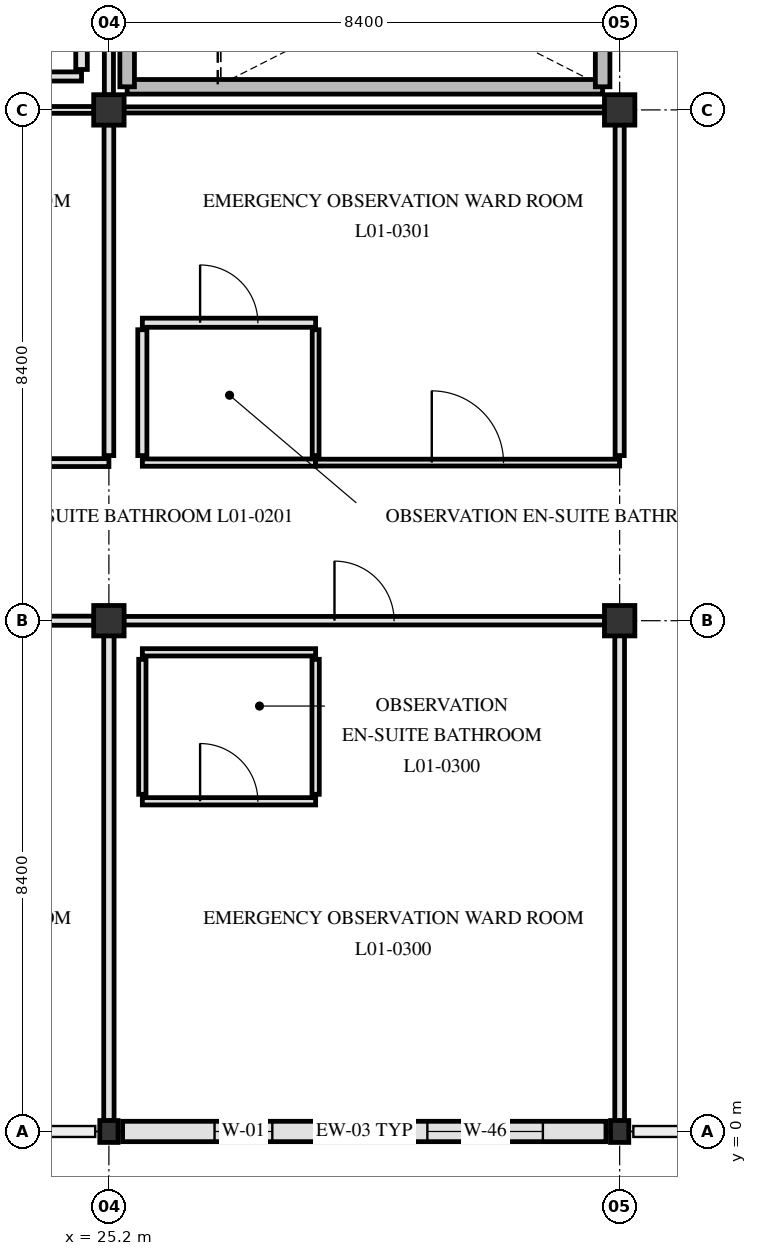
"""IFC4 building model, lengths in metres.
Left out: names, types, materials, properties, quantities, classifications, styles, units other than length and angle.
Written with IfcOpenShell. Run it as: python <this file> out.ifc"""

import sys

from ifc_helpers import new_model, si_unit, direction, frame, frame_2d, origin, origin_2d, place, context, subcontext, project, spatial, rectangle, i_section, extrude, element, fill, save


model = new_model("IFC4")
c1 = context("Model", 3, precision=1e-05, world=origin(), true_north=direction((0.0, 1.0)))
c2 = subcontext(c1, "Body", "Model", "MODEL_VIEW")
j1 = project(units=[si_unit("LENGTHUNIT", "METRE"), si_unit("PLANEANGLEUNIT", "RADIAN")], contexts=[c1])
p1 = place(None, origin())
s1 = spatial("IfcSite", under=j1, at=p1, CompositionType="ELEMENT")
p2 = place(p1, origin())
s2 = spatial("IfcBuilding", under=s1, at=p2, CompositionType="ELEMENT")
p3 = place(p2, frame((0.0, 0.0, 4.8)))
s3 = spatial("IfcBuildingStorey", under=s2, at=p3, CompositionType="ELEMENT", Elevation=4.8)
p4 = place(p3, frame((25.2, 0.0, 0.0), z_axis=(0.0, 0.0, 1.0), x_axis=(1.0, 0.0, 0.0)))
e1 = element("IfcColumn", 1, at=p4, inside=s3, PredefinedType="COLUMN", context=c2, shape_type="SweptSolid", body=[
    extrude(i_section(OverallWidth=0.3, OverallDepth=0.36, WebThickness=0.012, FlangeThickness=0.022, FilletRadius=0.027, at=origin_2d()), origin(), (0.0, 0.0, 1.0), 4.5),
])
for number, where, z_axis, x_axis in (
    (2, (25.2, 8.4, 0.0), (0.0, 0.0, 1.0), (1.0, 0.0, 0.0)),
    (3, (25.2, 16.8, 0.0), (0.0, 0.0, 1.0), (1.0, 0.0, 0.0)),
):
    element("IfcColumn", number, at=place(p3, frame(where, z_axis=z_axis, x_axis=x_axis)), inside=s3, PredefinedType="COLUMN", context=c2, shape_type="SweptSolid", body=[
        extrude(rectangle(XDim=0.5, YDim=0.5, at=origin_2d()), origin(), (0.0, 0.0, 1.0), 4.5),
    ])
p5 = place(p3, frame((33.6, 0.0, 0.0), z_axis=(0.0, 0.0, 1.0), x_axis=(1.0, 0.0, 0.0)))
e4 = element("IfcColumn", 4, at=p5, inside=s3, PredefinedType="COLUMN", context=c2, shape_type="SweptSolid", body=[
    extrude(i_section(OverallWidth=0.3, OverallDepth=0.36, WebThickness=0.012, FlangeThickness=0.022, FilletRadius=0.027, at=origin_2d()), origin(), (0.0, 0.0, 1.0), 4.5),
])
for number, where, z_axis, x_axis in (
    (5, (33.6, 8.4, 0.0), (0.0, 0.0, 1.0), (1.0, 0.0, 0.0)),
    (6, (33.6, 16.8, 0.0), (0.0, 0.0, 1.0), (1.0, 0.0, 0.0)),
):
    element("IfcColumn", number, at=place(p3, frame(where, z_axis=z_axis, x_axis=x_axis)), inside=s3, PredefinedType="COLUMN", context=c2, shape_type="SweptSolid", body=[
        extrude(rectangle(XDim=0.5, YDim=0.5, at=origin_2d()), origin(), (0.0, 0.0, 1.0), 4.5),
    ])
p6 = place(p3, frame((33.375, 0.0, 0.0), z_axis=(0.0, 0.0, 1.0), x_axis=(-1.0, 0.0, 0.0)))
e7 = element("IfcWall", 7, at=p6, inside=s3, PredefinedType="SOLIDWALL", context=c2, shape_type="SweptSolid", body=[
    extrude(rectangle(XDim=7.95, YDim=0.335, at=frame_2d((3.975, 0.0))), origin(), (0.0, 0.0, 1.0), 3.44),
])
p7 = place(p6, frame((1.038, 0.0, 0.85)))
e8 = element("IfcOpeningElement", 8, at=p7, cuts=e7, PredefinedType="OPENING", context=c2, shape_type="SweptSolid", body=[
    extrude(rectangle(XDim=1.9, YDim=1.78, at=frame_2d((0.95, 0.89))), frame((0.0, 0.177, 0.0), z_axis=(0.0, -1.0, 0.0), x_axis=(1.0, 0.0, 0.0)), (0.0, 0.0, 1.0), 0.355),
])
p8 = place(p6, frame((5.488, 0.0, 0.85)))
e9 = element("IfcOpeningElement", 9, at=p8, cuts=e7, PredefinedType="OPENING", context=c2, shape_type="SweptSolid", body=[
    extrude(rectangle(XDim=0.95, YDim=1.3, at=frame_2d((0.475, 0.65))), frame((0.0, 0.177, 0.0), z_axis=(0.0, -1.0, 0.0), x_axis=(1.0, 0.0, 0.0)), (0.0, 0.0, 1.0), 0.355),
])
p9 = place(p3, frame((25.5, 17.18, 0.0), z_axis=(0.0, 0.0, 1.0), x_axis=(1.0, 0.0, 0.0)))
e10 = element("IfcWall", 10, at=p9, inside=s3, PredefinedType="SHEAR", context=c2, shape_type="SweptSolid", body=[
    extrude(rectangle(XDim=7.82, YDim=0.24, at=frame_2d((3.91, 0.0))), origin(), (0.0, 0.0, 1.0), 4.15),
])
for number, where, z_axis, x_axis in (
    (11, (25.5, 17.18, 0.0), (0.0, 0.0, 1.0), (0.0, 1.0, 0.0)),
    (12, (33.32, 17.18, 0.0), (0.0, 0.0, 1.0), (0.0, 1.0, 0.0)),
):
    element("IfcWall", number, at=place(p3, frame(where, z_axis=z_axis, x_axis=x_axis)), inside=s3, PredefinedType="SHEAR", context=c2, shape_type="SweptSolid", body=[
        extrude(rectangle(XDim=3.32, YDim=0.24, at=frame_2d((1.66, 0.0))), origin(), (0.0, 0.0, 1.0), 4.15),
    ])
p10 = place(p3, frame((25.75, 5.43, 0.0), z_axis=(0.0, 0.0, 1.0), x_axis=(1.0, 0.0, 0.0)))
e13 = element("IfcWall", 13, at=p10, inside=s3, PredefinedType="PARTITIONING", context=c2, shape_type="SweptSolid", body=[
    extrude(rectangle(XDim=2.85, YDim=0.12, at=frame_2d((1.425, 0.0))), origin(), (0.0, 0.0, 1.0), 4.14),
])
p11 = place(p10, frame((0.95, 0.0, 0.0)))
e14 = element("IfcOpeningElement", 14, at=p11, cuts=e13, PredefinedType="OPENING", context=c2, shape_type="SweptSolid", body=[
    extrude(rectangle(XDim=0.95, YDim=2.1, at=frame_2d((0.475, 1.05))), frame((0.0, 0.07, 0.0), z_axis=(0.0, -1.0, 0.0), x_axis=(1.0, 0.0, 0.0)), (0.0, 0.0, 1.0), 0.14),
])
p12 = place(p3, frame((25.75, 7.88, 0.0), z_axis=(0.0, 0.0, 1.0), x_axis=(1.0, 0.0, 0.0)))
e15 = element("IfcWall", 15, at=p12, inside=s3, PredefinedType="PARTITIONING", context=c2, shape_type="SweptSolid", body=[
    extrude(rectangle(XDim=2.85, YDim=0.12, at=frame_2d((1.425, 0.0))), origin(), (0.0, 0.0, 1.0), 4.14),
])
p13 = place(p3, frame((17.045, 8.4, 0.0), z_axis=(0.0, 0.0, 1.0), x_axis=(1.0, 0.0, 0.0)))
e16 = element("IfcWall", 16, at=p13, inside=s3, PredefinedType="PARTITIONING", context=c2, shape_type="SweptSolid", body=[
    extrude(rectangle(XDim=7.91, YDim=0.15, at=frame_2d((3.955, 0.0))), origin(), (0.0, 0.0, 1.0), 3.54),
])
p14 = place(p13, frame((4.256, 0.0, 0.0)))
e17 = element("IfcOpeningElement", 17, at=p14, cuts=e16, PredefinedType="OPENING", context=c2, shape_type="SweptSolid", body=[
    extrude(rectangle(XDim=1.7, YDim=2.25, at=frame_2d((0.85, 1.125))), frame((0.0, 0.085, 0.0), z_axis=(0.0, -1.0, 0.0), x_axis=(1.0, 0.0, 0.0)), (0.0, 0.0, 1.0), 0.17),
])
p15 = place(p3, frame((25.445, 8.4, 0.0), z_axis=(0.0, 0.0, 1.0), x_axis=(1.0, 0.0, 0.0)))
e18 = element("IfcWall", 18, at=p15, inside=s3, PredefinedType="PARTITIONING", context=c2, shape_type="SweptSolid", body=[
    extrude(rectangle(XDim=7.91, YDim=0.14, at=frame_2d((3.955, 0.0))), origin(), (0.0, 0.0, 1.0), 3.54),
])
p16 = place(p15, frame((3.465, 0.0, 0.0)))
e19 = element("IfcOpeningElement", 19, at=p16, cuts=e18, PredefinedType="OPENING", context=c2, shape_type="SweptSolid", body=[
    extrude(rectangle(XDim=0.98, YDim=2.12, at=frame_2d((0.49, 1.06))), frame((0.0, 0.08, 0.0), z_axis=(0.0, -1.0, 0.0), x_axis=(1.0, 0.0, 0.0)), (0.0, 0.0, 1.0), 0.16),
])
p17 = place(p3, frame((20.2, 11.0, 0.0), z_axis=(0.0, 0.0, 1.0), x_axis=(1.0, 0.0, 0.0)))
e20 = element("IfcWall", 20, at=p17, inside=s3, PredefinedType="PARTITIONING", context=c2, shape_type="SweptSolid", body=[
    extrude(rectangle(XDim=5.0, YDim=0.13, at=frame_2d((2.5, 0.0))), origin(), (0.0, 0.0, 1.0), 3.59),
])
p18 = place(p17, frame((1.975, 0.0, 0.0)))
e21 = element("IfcOpeningElement", 21, at=p18, cuts=e20, PredefinedType="OPENING", context=c2, shape_type="SweptSolid", body=[
    extrude(rectangle(XDim=1.05, YDim=2.15, at=frame_2d((0.525, 1.075))), frame((0.0, 0.075, 0.0), z_axis=(0.0, -1.0, 0.0), x_axis=(1.0, 0.0, 0.0)), (0.0, 0.0, 1.0), 0.15),
])
p19 = place(p3, frame((25.75, 11.0, 0.0), z_axis=(0.0, 0.0, 1.0), x_axis=(1.0, 0.0, 0.0)))
e22 = element("IfcWall", 22, at=p19, inside=s3, PredefinedType="PARTITIONING", context=c2, shape_type="SweptSolid", body=[
    extrude(rectangle(XDim=2.85, YDim=0.12, at=frame_2d((1.425, 0.0))), origin(), (0.0, 0.0, 1.0), 4.14),
])
p20 = place(p3, frame((28.6, 11.0, 0.0), z_axis=(0.0, 0.0, 1.0), x_axis=(1.0, 0.0, 0.0)))
e23 = element("IfcWall", 23, at=p20, inside=s3, PredefinedType="PARTITIONING", context=c2, shape_type="SweptSolid", body=[
    extrude(rectangle(XDim=5.0, YDim=0.112, at=frame_2d((2.5, 0.0))), origin(), (0.0, 0.0, 1.0), 3.59),
])
p21 = place(p20, frame((1.91, 0.0, 0.0)))
e24 = element("IfcOpeningElement", 24, at=p21, cuts=e23, PredefinedType="OPENING", context=c2, shape_type="SweptSolid", body=[
    extrude(rectangle(XDim=1.18, YDim=2.18, at=frame_2d((0.59, 1.09))), frame((0.0, 0.066, 0.0), z_axis=(0.0, -1.0, 0.0), x_axis=(1.0, 0.0, 0.0)), (0.0, 0.0, 1.0), 0.132),
])
p22 = place(p3, frame((25.75, 13.3, 0.0), z_axis=(0.0, 0.0, 1.0), x_axis=(1.0, 0.0, 0.0)))
e25 = element("IfcWall", 25, at=p22, inside=s3, PredefinedType="PARTITIONING", context=c2, shape_type="SweptSolid", body=[
    extrude(rectangle(XDim=2.85, YDim=0.15, at=frame_2d((1.425, 0.0))), origin(), (0.0, 0.0, 1.0), 4.14),
])
p23 = place(p22, frame((0.95, 0.0, 0.0)))
e26 = element("IfcOpeningElement", 26, at=p23, cuts=e25, PredefinedType="OPENING", context=c2, shape_type="SweptSolid", body=[
    extrude(rectangle(XDim=0.95, YDim=2.1, at=frame_2d((0.475, 1.05))), frame((0.0, 0.085, 0.0), z_axis=(0.0, -1.0, 0.0), x_axis=(1.0, 0.0, 0.0)), (0.0, 0.0, 1.0), 0.17),
])
p24 = place(p3, frame((17.045, 16.8, 0.0), z_axis=(0.0, 0.0, 1.0), x_axis=(1.0, 0.0, 0.0)))
e27 = element("IfcWall", 27, at=p24, inside=s3, PredefinedType="PARTITIONING", context=c2, shape_type="SweptSolid", body=[
    extrude(rectangle(XDim=7.91, YDim=0.112, at=frame_2d((3.955, 0.0))), origin(), (0.0, 0.0, 1.0), 3.54),
])
p25 = place(p3, frame((25.445, 16.8, 0.0), z_axis=(0.0, 0.0, 1.0), x_axis=(1.0, 0.0, 0.0)))
e28 = element("IfcWall", 28, at=p25, inside=s3, PredefinedType="PARTITIONING", context=c2, shape_type="SweptSolid", body=[
    extrude(rectangle(XDim=7.91, YDim=0.1, at=frame_2d((3.955, 0.0))), origin(), (0.0, 0.0, 1.0), 3.54),
])
p26 = place(p3, frame((22.75, 17.35, 0.0), z_axis=(0.0, 0.0, 1.0), x_axis=(1.0, 0.0, 0.0)))
e29 = element("IfcWall", 29, at=p26, inside=s3, PredefinedType="PARTITIONING", context=c2, shape_type="SweptSolid", body=[
    extrude(rectangle(XDim=2.0, YDim=0.15, at=frame_2d((1.0, 0.0))), origin(), (0.0, 0.0, 1.0), 4.14),
])
p27 = place(p3, frame((24.75, 17.465, 0.0), z_axis=(0.0, 0.0, 1.0), x_axis=(0.0, 1.0, 0.0)))
e30 = element("IfcWall", 30, at=p27, inside=s3, PredefinedType="PARTITIONING", context=c2, shape_type="SweptSolid", body=[
    extrude(rectangle(XDim=5.135, YDim=0.19, at=frame_2d((2.567, 0.0))), origin(), (0.0, 0.0, 1.0), 4.14),
])
p28 = place(p3, frame((25.2, 0.175, 0.0), z_axis=(0.0, 0.0, 1.0), x_axis=(0.0, 1.0, 0.0)))
e31 = element("IfcWall", 31, at=p28, inside=s3, PredefinedType="PARTITIONING", context=c2, shape_type="SweptSolid", body=[
    extrude(rectangle(XDim=7.98, YDim=0.17, at=frame_2d((3.99, 0.0))), origin(), (0.0, 0.0, 1.0), 3.59),
])
p29 = place(p3, frame((25.2, 11.115, 0.0), z_axis=(0.0, 0.0, 1.0), x_axis=(0.0, 1.0, 0.0)))
e32 = element("IfcWall", 32, at=p29, inside=s3, PredefinedType="PARTITIONING", context=c2, shape_type="SweptSolid", body=[
    extrude(rectangle(XDim=5.44, YDim=0.16, at=frame_2d((2.72, 0.0))), origin(), (0.0, 0.0, 1.0), 3.59),
])
p30 = place(p3, frame((25.2, 17.045, 0.0), z_axis=(0.0, 0.0, 1.0), x_axis=(0.0, 1.0, 0.0)))
e33 = element("IfcWall", 33, at=p30, inside=s3, PredefinedType="PARTITIONING", context=c2, shape_type="SweptSolid", body=[
    extrude(rectangle(XDim=5.555, YDim=0.15, at=frame_2d((2.778, 0.0))), origin(), (0.0, 0.0, 1.0), 3.59),
])
p31 = place(p3, frame((25.75, 5.545, 0.0), z_axis=(0.0, 0.0, 1.0), x_axis=(0.0, 1.0, 0.0)))
e34 = element("IfcWall", 34, at=p31, inside=s3, PredefinedType="PARTITIONING", context=c2, shape_type="SweptSolid", body=[
    extrude(rectangle(XDim=2.22, YDim=0.12, at=frame_2d((1.11, 0.0))), origin(), (0.0, 0.0, 1.0), 4.14),
])
p32 = place(p3, frame((25.75, 11.115, 0.0), z_axis=(0.0, 0.0, 1.0), x_axis=(0.0, 1.0, 0.0)))
e35 = element("IfcWall", 35, at=p32, inside=s3, PredefinedType="PARTITIONING", context=c2, shape_type="SweptSolid", body=[
    extrude(rectangle(XDim=2.07, YDim=0.15, at=frame_2d((1.035, 0.0))), origin(), (0.0, 0.0, 1.0), 4.14),
])
p33 = place(p3, frame((28.6, 5.545, 0.0), z_axis=(0.0, 0.0, 1.0), x_axis=(0.0, 1.0, 0.0)))
e36 = element("IfcWall", 36, at=p33, inside=s3, PredefinedType="PARTITIONING", context=c2, shape_type="SweptSolid", body=[
    extrude(rectangle(XDim=2.22, YDim=0.12, at=frame_2d((1.11, 0.0))), origin(), (0.0, 0.0, 1.0), 4.14),
])
p34 = place(p3, frame((28.6, 11.115, 0.0), z_axis=(0.0, 0.0, 1.0), x_axis=(0.0, 1.0, 0.0)))
e37 = element("IfcWall", 37, at=p34, inside=s3, PredefinedType="PARTITIONING", context=c2, shape_type="SweptSolid", body=[
    extrude(rectangle(XDim=2.07, YDim=0.112, at=frame_2d((1.035, 0.0))), origin(), (0.0, 0.0, 1.0), 4.14),
])
p35 = place(p3, frame((33.6, 0.175, 0.0), z_axis=(0.0, 0.0, 1.0), x_axis=(0.0, 1.0, 0.0)))
e38 = element("IfcWall", 38, at=p35, inside=s3, PredefinedType="PARTITIONING", context=c2, shape_type="SweptSolid", body=[
    extrude(rectangle(XDim=7.98, YDim=0.16, at=frame_2d((3.99, 0.0))), origin(), (0.0, 0.0, 1.0), 3.59),
])
p36 = place(p3, frame((33.6, 11.115, 0.0), z_axis=(0.0, 0.0, 1.0), x_axis=(0.0, 1.0, 0.0)))
e39 = element("IfcWall", 39, at=p36, inside=s3, PredefinedType="PARTITIONING", context=c2, shape_type="SweptSolid", body=[
    extrude(rectangle(XDim=5.44, YDim=0.15, at=frame_2d((2.72, 0.0))), origin(), (0.0, 0.0, 1.0), 3.59),
])
p37 = place(p7, origin())
e40 = element("IfcWindow", 40, at=p37, inside=s3, PartitioningType="SINGLE_PANEL", PredefinedType="WINDOW", context=c2, shape_type="SweptSolid", body=[
    extrude(rectangle(XDim=1.9, YDim=1.78, at=frame_2d((0.95, 0.89))), frame((0.0, 0.03, 0.0), z_axis=(0.0, -1.0, 0.0), x_axis=(1.0, 0.0, 0.0)), (0.0, 0.0, 1.0), 0.06),
])
fill(e8, e40)
p38 = place(p8, origin())
e41 = element("IfcWindow", 41, at=p38, inside=s3, PartitioningType="SINGLE_PANEL", PredefinedType="WINDOW", context=c2, shape_type="SweptSolid", body=[
    extrude(rectangle(XDim=0.95, YDim=1.3, at=frame_2d((0.475, 0.65))), frame((0.0, 0.03, 0.0), z_axis=(0.0, -1.0, 0.0), x_axis=(1.0, 0.0, 0.0)), (0.0, 0.0, 1.0), 0.06),
])
fill(e9, e41)
p39 = place(p16, origin())
e42 = element("IfcDoor", 42, at=p39, inside=s3, OperationType="SINGLE_SWING_LEFT", PredefinedType="DOOR", context=c2, shape_type="SweptSolid", body=[
    extrude(rectangle(XDim=0.98, YDim=2.12, at=frame_2d((0.49, 1.06))), frame((0.0, 0.025, 0.0), z_axis=(0.0, -1.0, 0.0), x_axis=(1.0, 0.0, 0.0)), (0.0, 0.0, 1.0), 0.05),
])
fill(e19, e42)
p40 = place(p11, origin())
e43 = element("IfcDoor", 43, at=p40, inside=s3, OperationType="SINGLE_SWING_LEFT", PredefinedType="DOOR", context=c2, shape_type="SweptSolid", body=[
    extrude(rectangle(XDim=0.95, YDim=2.1, at=frame_2d((0.475, 1.05))), frame((0.0, 0.025, 0.0), z_axis=(0.0, -1.0, 0.0), x_axis=(1.0, 0.0, 0.0)), (0.0, 0.0, 1.0), 0.05),
])
fill(e14, e43)
p41 = place(p21, origin())
e44 = element("IfcDoor", 44, at=p41, inside=s3, OperationType="SINGLE_SWING_LEFT", PredefinedType="DOOR", context=c2, shape_type="SweptSolid", body=[
    extrude(rectangle(XDim=1.18, YDim=2.18, at=frame_2d((0.59, 1.09))), frame((0.0, 0.025, 0.0), z_axis=(0.0, -1.0, 0.0), x_axis=(1.0, 0.0, 0.0)), (0.0, 0.0, 1.0), 0.05),
])
fill(e24, e44)
p42 = place(p23, origin())
e45 = element("IfcDoor", 45, at=p42, inside=s3, OperationType="SINGLE_SWING_LEFT", PredefinedType="DOOR", context=c2, shape_type="SweptSolid", body=[
    extrude(rectangle(XDim=0.95, YDim=2.1, at=frame_2d((0.475, 1.05))), frame((0.0, 0.025, 0.0), z_axis=(0.0, -1.0, 0.0), x_axis=(1.0, 0.0, 0.0)), (0.0, 0.0, 1.0), 0.05),
])
fill(e26, e45)
save(model, sys.argv[1])
